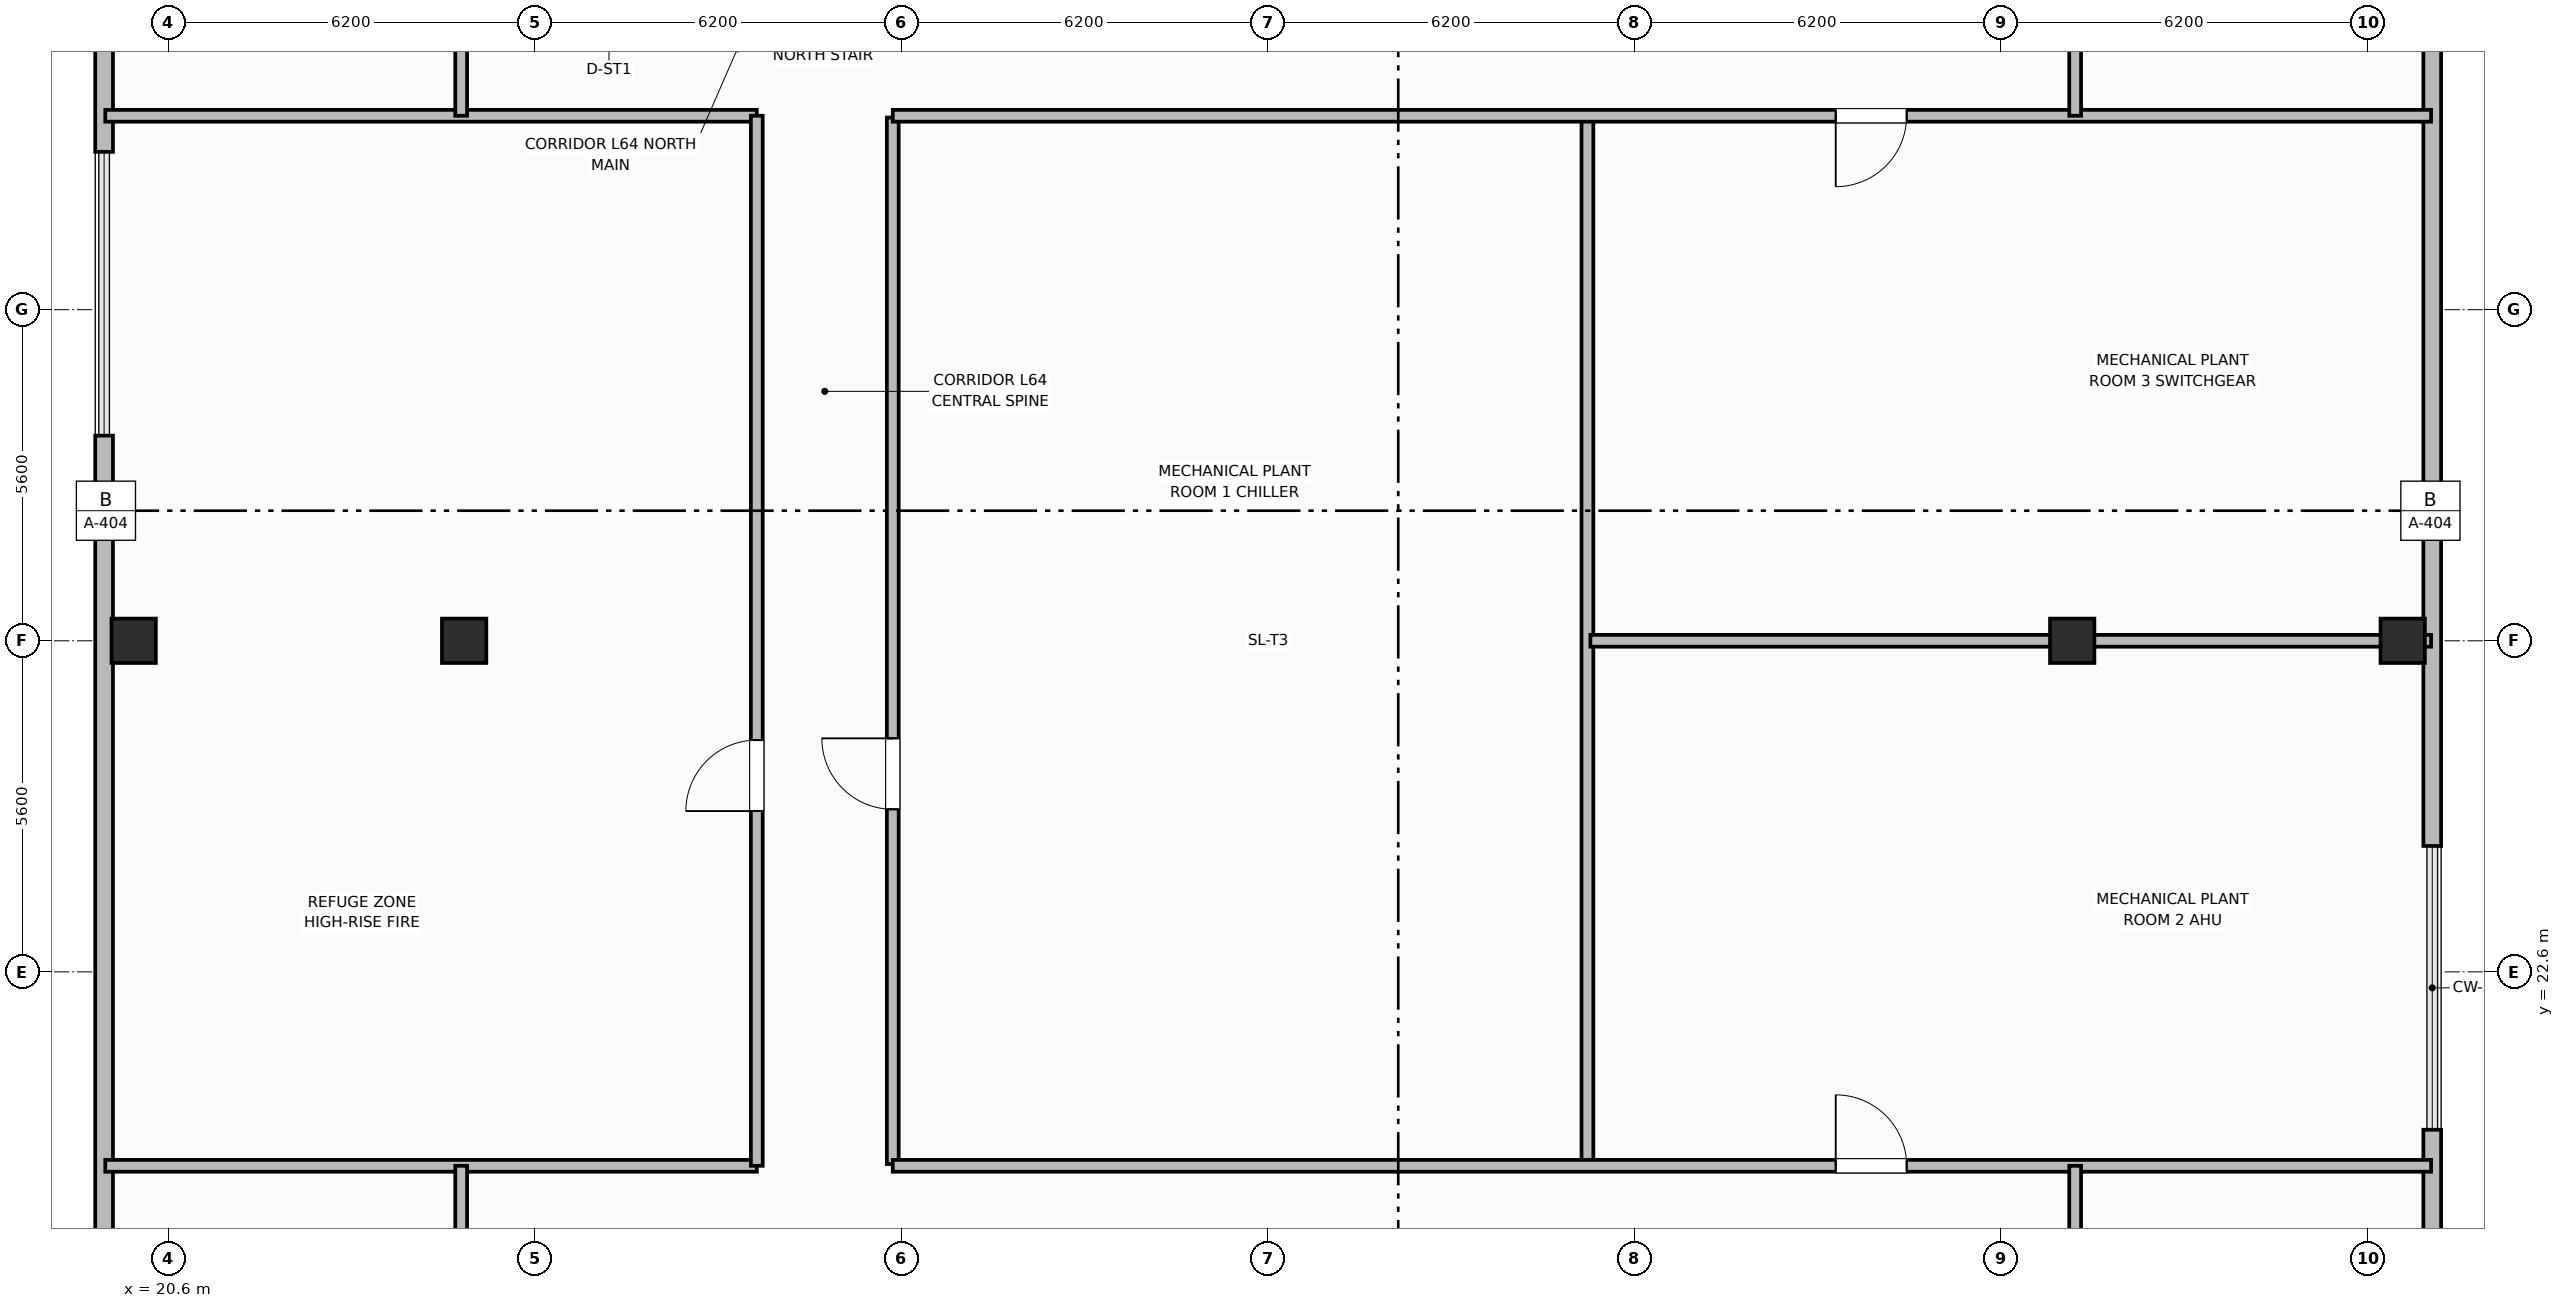
"""IFC4 building model, lengths in metres.
Left out: names, types, materials, properties, quantities, classifications, styles, units other than length and angle.
Written with IfcOpenShell. Run it as: python <this file> out.ifc"""

import sys

from ifc_helpers import new_model, si_unit, direction, frame, frame_2d, origin, origin_2d, place, context, subcontext, project, spatial, rectangle, extrude, element, fill, save


model = new_model("IFC4")
c1 = context("Model", 3, precision=1e-05, world=origin(), true_north=direction((0.0, 1.0)))
c2 = subcontext(c1, "Body", "Model", "MODEL_VIEW")
j1 = project(units=[si_unit("LENGTHUNIT", "METRE"), si_unit("PLANEANGLEUNIT", "RADIAN")], contexts=[c1])
p1 = place(None, origin())
s1 = spatial("IfcSite", under=j1, at=p1, CompositionType="ELEMENT")
p2 = place(p1, origin())
s2 = spatial("IfcBuilding", under=s1, at=p2, CompositionType="ELEMENT")
p3 = place(p2, frame((0.0, 0.0, 255.4)))
s3 = spatial("IfcBuildingStorey", under=s2, at=p3, CompositionType="ELEMENT", Elevation=255.4)
for number, where, z_axis, x_axis in (
    (1, (25.6, 28.2, 0.0), (0.0, 0.0, 1.0), (1.0, 0.0, 0.0)),
    (2, (52.8, 28.2, 0.0), (0.0, 0.0, 1.0), (1.0, 0.0, 0.0)),
    (3, (20.01, 28.2, 0.0), (0.0, 0.0, 1.0), (1.0, 0.0, 0.0)),
    (4, (58.39, 28.2, 0.0), (0.0, 0.0, 1.0), (1.0, 0.0, 0.0)),
):
    element("IfcColumn", number, at=place(p3, frame(where, z_axis=z_axis, x_axis=x_axis)), inside=s3, PredefinedType="COLUMN", context=c2, shape_type="SweptSolid", body=[
        extrude(rectangle(XDim=0.75, YDim=0.75, at=origin_2d()), origin(), (0.0, 0.0, 1.0), 4.8),
    ])
p4 = place(p3, frame((58.89, 12.68, 0.0), z_axis=(0.0, 0.0, 1.0), x_axis=(0.0, 1.0, 0.0)))
e5 = element("IfcWall", 5, at=p4, inside=s3, PredefinedType="SOLIDWALL", context=c2, shape_type="SweptSolid", body=[
    extrude(rectangle(XDim=7.25, YDim=0.3, at=frame_2d((3.625, 0.0))), origin(), (0.0, 0.0, 1.0), 3.83),
])
p5 = place(p3, frame((58.89, 24.73, 0.0), z_axis=(0.0, 0.0, 1.0), x_axis=(0.0, 1.0, 0.0)))
e6 = element("IfcWall", 6, at=p5, inside=s3, PredefinedType="SOLIDWALL", context=c2, shape_type="SweptSolid", body=[
    extrude(rectangle(XDim=18.99, YDim=0.3, at=frame_2d((9.495, 0.0))), origin(), (0.0, 0.0, 1.0), 3.83),
])
p6 = place(p3, frame((19.51, 43.72, 0.0), z_axis=(0.0, 0.0, 1.0), x_axis=(0.0, -1.0, 0.0)))
e7 = element("IfcWall", 7, at=p6, inside=s3, PredefinedType="SOLIDWALL", context=c2, shape_type="SweptSolid", body=[
    extrude(rectangle(XDim=7.25, YDim=0.3, at=frame_2d((3.625, 0.0))), origin(), (0.0, 0.0, 1.0), 3.83),
])
p7 = place(p3, frame((19.51, 31.67, 0.0), z_axis=(0.0, 0.0, 1.0), x_axis=(0.0, -1.0, 0.0)))
e8 = element("IfcWall", 8, at=p7, inside=s3, PredefinedType="SOLIDWALL", context=c2, shape_type="SweptSolid", body=[
    extrude(rectangle(XDim=18.99, YDim=0.3, at=frame_2d((9.495, 0.0))), origin(), (0.0, 0.0, 1.0), 3.83),
])
for number, where, z_axis, x_axis in (
    (9, (19.53, 19.32, 0.0), (0.0, 0.0, 1.0), (1.0, 0.0, 0.0)),
    (10, (19.53, 37.08, 0.0), (0.0, 0.0, 1.0), (1.0, 0.0, 0.0)),
):
    element("IfcWall", number, at=place(p3, frame(where, z_axis=z_axis, x_axis=x_axis)), inside=s3, PredefinedType="PARTITIONING", context=c2, shape_type="SweptSolid", body=[
        extrude(rectangle(XDim=11.02, YDim=0.2, at=frame_2d((5.51, 0.0))), origin(), (0.0, 0.0, 1.0), 3.66),
    ])
p8 = place(p3, frame((30.55, 19.32, 0.0), z_axis=(0.0, 0.0, 1.0), x_axis=(0.0, 1.0, 0.0)))
e11 = element("IfcWall", 11, at=p8, inside=s3, PredefinedType="PARTITIONING", context=c2, shape_type="SweptSolid", body=[
    extrude(rectangle(XDim=17.76, YDim=0.2, at=frame_2d((8.88, 0.0))), origin(), (0.0, 0.0, 1.0), 3.66),
])
p9 = place(p8, frame((6.0, 0.0, 0.0)))
e12 = element("IfcOpeningElement", 12, at=p9, cuts=e11, PredefinedType="OPENING", context=c2, shape_type="SweptSolid", body=[
    extrude(rectangle(XDim=1.2, YDim=2.15, at=frame_2d((0.6, 1.075))), frame((0.0, 0.11, 0.0), z_axis=(0.0, -1.0, 0.0), x_axis=(1.0, 0.0, 0.0)), (0.0, 0.0, 1.0), 0.22),
])
p10 = place(p3, frame((32.85, 19.35, 0.0), z_axis=(0.0, 0.0, 1.0), x_axis=(0.0, 1.0, 0.0)))
e13 = element("IfcWall", 13, at=p10, inside=s3, PredefinedType="PARTITIONING", context=c2, shape_type="SweptSolid", body=[
    extrude(rectangle(XDim=17.7, YDim=0.2, at=frame_2d((8.85, 0.0))), origin(), (0.0, 0.0, 1.0), 3.66),
])
p11 = place(p10, frame((6.0, 0.0, 0.0)))
e14 = element("IfcOpeningElement", 14, at=p11, cuts=e13, PredefinedType="OPENING", context=c2, shape_type="SweptSolid", body=[
    extrude(rectangle(XDim=1.2, YDim=2.15, at=frame_2d((0.6, 1.075))), frame((0.0, 0.11, 0.0), z_axis=(0.0, -1.0, 0.0), x_axis=(1.0, 0.0, 0.0)), (0.0, 0.0, 1.0), 0.22),
])
p12 = place(p3, frame((44.6, 19.35, 0.0), z_axis=(0.0, 0.0, 1.0), x_axis=(0.0, 1.0, 0.0)))
e15 = element("IfcWall", 15, at=p12, inside=s3, PredefinedType="PARTITIONING", context=c2, shape_type="SweptSolid", body=[
    extrude(rectangle(XDim=17.7, YDim=0.2, at=frame_2d((8.85, 0.0))), origin(), (0.0, 0.0, 1.0), 3.66),
])
p13 = place(p3, frame((44.65, 28.2, 0.0), z_axis=(0.0, 0.0, 1.0), x_axis=(1.0, 0.0, 0.0)))
e16 = element("IfcWall", 16, at=p13, inside=s3, PredefinedType="PARTITIONING", context=c2, shape_type="SweptSolid", body=[
    extrude(rectangle(XDim=14.22, YDim=0.2, at=frame_2d((7.11, 0.0))), origin(), (0.0, 0.0, 1.0), 3.66),
])
p14 = place(p3, frame((32.85, 19.32, 0.0), z_axis=(0.0, 0.0, 1.0), x_axis=(1.0, 0.0, 0.0)))
e17 = element("IfcWall", 17, at=p14, inside=s3, PredefinedType="PARTITIONING", context=c2, shape_type="SweptSolid", body=[
    extrude(rectangle(XDim=26.02, YDim=0.2, at=frame_2d((13.01, 0.0))), origin(), (0.0, 0.0, 1.0), 3.66),
])
p15 = place(p14, frame((15.95, 0.0, 0.0)))
e18 = element("IfcOpeningElement", 18, at=p15, cuts=e17, PredefinedType="OPENING", context=c2, shape_type="SweptSolid", body=[
    extrude(rectangle(XDim=1.2, YDim=2.15, at=frame_2d((0.6, 1.075))), frame((0.0, 0.11, 0.0), z_axis=(0.0, -1.0, 0.0), x_axis=(1.0, 0.0, 0.0)), (0.0, 0.0, 1.0), 0.22),
])
p16 = place(p3, frame((58.87, 37.08, 0.0), z_axis=(0.0, 0.0, 1.0), x_axis=(-1.0, 0.0, 0.0)))
e19 = element("IfcWall", 19, at=p16, inside=s3, PredefinedType="PARTITIONING", context=c2, shape_type="SweptSolid", body=[
    extrude(rectangle(XDim=26.02, YDim=0.2, at=frame_2d((13.01, 0.0))), origin(), (0.0, 0.0, 1.0), 3.66),
])
p17 = place(p16, frame((8.87, 0.0, 0.0)))
e20 = element("IfcOpeningElement", 20, at=p17, cuts=e19, PredefinedType="OPENING", context=c2, shape_type="SweptSolid", body=[
    extrude(rectangle(XDim=1.2, YDim=2.15, at=frame_2d((0.6, 1.075))), frame((0.0, 0.11, 0.0), z_axis=(0.0, -1.0, 0.0), x_axis=(1.0, 0.0, 0.0)), (0.0, 0.0, 1.0), 0.22),
])
p18 = place(p3, frame((52.85, 16.95, 0.0), z_axis=(0.0, 0.0, 1.0), x_axis=(0.0, 1.0, 0.0)))
e21 = element("IfcWall", 21, at=p18, inside=s3, PredefinedType="PARTITIONING", context=c2, shape_type="SweptSolid", body=[
    extrude(rectangle(XDim=2.37, YDim=0.2, at=frame_2d((1.185, 0.0))), origin(), (0.0, 0.0, 1.0), 3.66),
])
p19 = place(p3, frame((52.85, 37.08, 0.0), z_axis=(0.0, 0.0, 1.0), x_axis=(0.0, 1.0, 0.0)))
e22 = element("IfcWall", 22, at=p19, inside=s3, PredefinedType="PARTITIONING", context=c2, shape_type="SweptSolid", body=[
    extrude(rectangle(XDim=2.37, YDim=0.2, at=frame_2d((1.185, 0.0))), origin(), (0.0, 0.0, 1.0), 3.66),
])
p20 = place(p3, frame((25.55, 16.95, 0.0), z_axis=(0.0, 0.0, 1.0), x_axis=(0.0, 1.0, 0.0)))
e23 = element("IfcWall", 23, at=p20, inside=s3, PredefinedType="PARTITIONING", context=c2, shape_type="SweptSolid", body=[
    extrude(rectangle(XDim=2.37, YDim=0.2, at=frame_2d((1.185, 0.0))), origin(), (0.0, 0.0, 1.0), 3.66),
])
p21 = place(p3, frame((25.55, 37.08, 0.0), z_axis=(0.0, 0.0, 1.0), x_axis=(0.0, 1.0, 0.0)))
e24 = element("IfcWall", 24, at=p21, inside=s3, PredefinedType="PARTITIONING", context=c2, shape_type="SweptSolid", body=[
    extrude(rectangle(XDim=2.37, YDim=0.2, at=frame_2d((1.185, 0.0))), origin(), (0.0, 0.0, 1.0), 3.66),
])
p22 = place(p9, origin())
e25 = element("IfcDoor", 25, at=p22, inside=s3, OperationType="SINGLE_SWING_LEFT", PredefinedType="DOOR", context=c2, shape_type="SweptSolid", body=[
    extrude(rectangle(XDim=1.2, YDim=2.15, at=frame_2d((0.6, 1.075))), frame((0.0, 0.025, 0.0), z_axis=(0.0, -1.0, 0.0), x_axis=(1.0, 0.0, 0.0)), (0.0, 0.0, 1.0), 0.05),
])
fill(e12, e25)
p23 = place(p11, origin())
e26 = element("IfcDoor", 26, at=p23, inside=s3, OperationType="SINGLE_SWING_RIGHT", PredefinedType="DOOR", context=c2, shape_type="SweptSolid", body=[
    extrude(rectangle(XDim=1.2, YDim=2.15, at=frame_2d((0.6, 1.075))), frame((0.0, 0.025, 0.0), z_axis=(0.0, -1.0, 0.0), x_axis=(1.0, 0.0, 0.0)), (0.0, 0.0, 1.0), 0.05),
])
fill(e14, e26)
p24 = place(p15, origin())
e27 = element("IfcDoor", 27, at=p24, inside=s3, OperationType="SINGLE_SWING_LEFT", PredefinedType="DOOR", context=c2, shape_type="SweptSolid", body=[
    extrude(rectangle(XDim=1.2, YDim=2.15, at=frame_2d((0.6, 1.075))), frame((0.0, 0.025, 0.0), z_axis=(0.0, -1.0, 0.0), x_axis=(1.0, 0.0, 0.0)), (0.0, 0.0, 1.0), 0.05),
])
fill(e18, e27)
p25 = place(p17, origin())
e28 = element("IfcDoor", 28, at=p25, inside=s3, OperationType="SINGLE_SWING_RIGHT", PredefinedType="DOOR", context=c2, shape_type="SweptSolid", body=[
    extrude(rectangle(XDim=1.2, YDim=2.15, at=frame_2d((0.6, 1.075))), frame((0.0, 0.025, 0.0), z_axis=(0.0, -1.0, 0.0), x_axis=(1.0, 0.0, 0.0)), (0.0, 0.0, 1.0), 0.05),
])
fill(e20, e28)
save(model, sys.argv[1])
